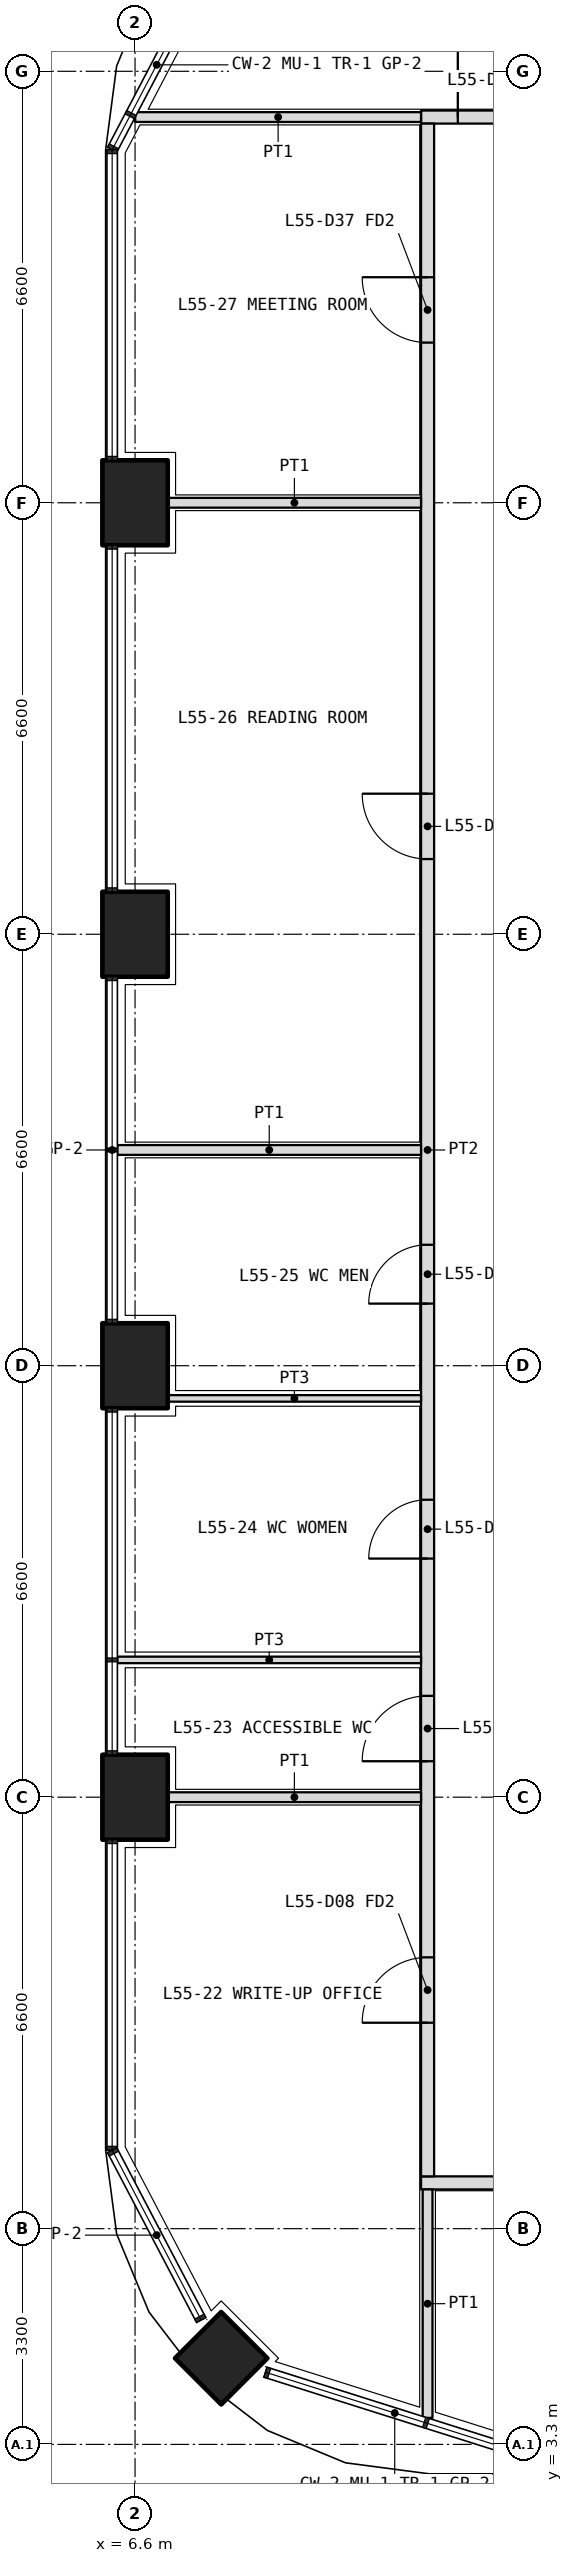
"""IFC4 building model, lengths in metres.
Left out: names, types, materials, properties, quantities, classifications, styles, units other than length and angle.
Written with IfcOpenShell. Run it as: python <this file> out.ifc"""

import sys

from ifc_helpers import new_model, si_unit, direction, frame, frame_2d, origin, origin_2d, place, context, subcontext, project, spatial, rectangle, extrude, element, fill, save


model = new_model("IFC4")
c1 = context("Model", 3, precision=1e-05, world=origin(), true_north=direction((0.0, 1.0)))
c2 = subcontext(c1, "Body", "Model", "MODEL_VIEW")
j1 = project(units=[si_unit("LENGTHUNIT", "METRE"), si_unit("PLANEANGLEUNIT", "RADIAN")], contexts=[c1])
p1 = place(None, origin())
s1 = spatial("IfcSite", under=j1, at=p1, CompositionType="ELEMENT")
p2 = place(p1, origin())
s2 = spatial("IfcBuilding", under=s1, at=p2, CompositionType="ELEMENT")
p3 = place(p2, frame((0.0, 0.0, 241.8)))
s3 = spatial("IfcBuildingStorey", under=s2, at=p3, CompositionType="ELEMENT", Elevation=241.8)
p4 = place(p3, frame((7.918, 4.618, 0.0), z_axis=(0.0, 0.0, 1.0), x_axis=(0.707106781187, 0.707106781187, 0.0)))
e1 = element("IfcColumn", 1, at=p4, inside=s3, PredefinedType="COLUMN", context=c2, shape_type="SweptSolid", body=[
    extrude(rectangle(XDim=1.0, YDim=1.0, at=origin_2d()), origin(), (0.0, 0.0, 1.0), 4.2),
])
for number, where, z_axis, x_axis in (
    (2, (6.6, 13.2, 0.0), (0.0, 0.0, 1.0), (0.0, 1.0, 0.0)),
    (3, (6.6, 19.8, 0.0), (0.0, 0.0, 1.0), (0.0, 1.0, 0.0)),
    (4, (6.6, 26.4, 0.0), (0.0, 0.0, 1.0), (0.0, 1.0, 0.0)),
    (5, (6.6, 33.0, 0.0), (0.0, 0.0, 1.0), (0.0, 1.0, 0.0)),
):
    element("IfcColumn", number, at=place(p3, frame(where, z_axis=z_axis, x_axis=x_axis)), inside=s3, PredefinedType="COLUMN", context=c2, shape_type="SweptSolid", body=[
        extrude(rectangle(XDim=1.3, YDim=1.0, at=origin_2d()), origin(), (0.0, 0.0, 1.0), 4.2),
    ])
p5 = place(p3, frame((10.975, 7.3, 0.0), z_axis=(0.0, 0.0, 1.0), x_axis=(1.0, 0.0, 0.0)))
e6 = element("IfcWall", 6, at=p5, inside=s3, PredefinedType="PARTITIONING", context=c2, shape_type="SweptSolid", body=[
    extrude(rectangle(XDim=30.85, YDim=0.2, at=frame_2d((15.425, 0.0))), origin(), (0.0, 0.0, 1.0), 3.0),
])
p6 = place(p5, frame((3.863, 0.0, 0.0)))
e7 = element("IfcOpeningElement", 7, at=p6, cuts=e6, PredefinedType="OPENING", context=c2, shape_type="SweptSolid", body=[
    extrude(rectangle(XDim=1.2, YDim=2.1, at=frame_2d((0.6, 1.05))), frame((0.0, 0.11, 0.0), z_axis=(0.0, -1.0, 0.0), x_axis=(1.0, 0.0, 0.0)), (0.0, 0.0, 1.0), 0.22),
])
p7 = place(p5, frame((16.575, 0.0, 0.0)))
e8 = element("IfcOpeningElement", 8, at=p7, cuts=e6, PredefinedType="OPENING", context=c2, shape_type="SweptSolid", body=[
    extrude(rectangle(XDim=1.0, YDim=2.1, at=frame_2d((0.5, 1.05))), frame((0.0, 0.11, 0.0), z_axis=(0.0, -1.0, 0.0), x_axis=(1.0, 0.0, 0.0)), (0.0, 0.0, 1.0), 0.22),
])
p8 = place(p5, frame((27.538, 0.0, 0.0)))
e9 = element("IfcOpeningElement", 9, at=p8, cuts=e6, PredefinedType="OPENING", context=c2, shape_type="SweptSolid", body=[
    extrude(rectangle(XDim=1.0, YDim=2.1, at=frame_2d((0.5, 1.05))), frame((0.0, 0.11, 0.0), z_axis=(0.0, -1.0, 0.0), x_axis=(1.0, 0.0, 0.0)), (0.0, 0.0, 1.0), 0.22),
])
p9 = place(p3, frame((10.975, 38.9, 0.0), z_axis=(0.0, 0.0, 1.0), x_axis=(1.0, 0.0, 0.0)))
e10 = element("IfcWall", 10, at=p9, inside=s3, PredefinedType="PARTITIONING", context=c2, shape_type="SweptSolid", body=[
    extrude(rectangle(XDim=22.025, YDim=0.2, at=frame_2d((11.012, 0.0))), origin(), (0.0, 0.0, 1.0), 3.0),
])
p10 = place(p9, frame((0.562, 0.0, 0.0)))
e11 = element("IfcOpeningElement", 11, at=p10, cuts=e10, PredefinedType="OPENING", context=c2, shape_type="SweptSolid", body=[
    extrude(rectangle(XDim=1.2, YDim=2.1, at=frame_2d((0.6, 1.05))), frame((0.0, 0.11, 0.0), z_axis=(0.0, -1.0, 0.0), x_axis=(1.0, 0.0, 0.0)), (0.0, 0.0, 1.0), 0.22),
])
p11 = place(p9, frame((6.675, 0.0, 0.0)))
e12 = element("IfcOpeningElement", 12, at=p11, cuts=e10, PredefinedType="OPENING", context=c2, shape_type="SweptSolid", body=[
    extrude(rectangle(XDim=1.0, YDim=2.1, at=frame_2d((0.5, 1.05))), frame((0.0, 0.11, 0.0), z_axis=(0.0, -1.0, 0.0), x_axis=(1.0, 0.0, 0.0)), (0.0, 0.0, 1.0), 0.22),
])
p12 = place(p9, frame((13.375, 0.0, 0.0)))
e13 = element("IfcOpeningElement", 13, at=p12, cuts=e10, PredefinedType="OPENING", context=c2, shape_type="SweptSolid", body=[
    extrude(rectangle(XDim=1.0, YDim=2.1, at=frame_2d((0.5, 1.05))), frame((0.0, 0.11, 0.0), z_axis=(0.0, -1.0, 0.0), x_axis=(1.0, 0.0, 0.0)), (0.0, 0.0, 1.0), 0.22),
])
p13 = place(p9, frame((16.675, 0.0, 0.0)))
e14 = element("IfcOpeningElement", 14, at=p13, cuts=e10, PredefinedType="OPENING", context=c2, shape_type="SweptSolid", body=[
    extrude(rectangle(XDim=1.0, YDim=2.1, at=frame_2d((0.5, 1.05))), frame((0.0, 0.11, 0.0), z_axis=(0.0, -1.0, 0.0), x_axis=(1.0, 0.0, 0.0)), (0.0, 0.0, 1.0), 0.22),
])
p14 = place(p9, frame((19.875, 0.0, 0.0)))
e15 = element("IfcOpeningElement", 15, at=p14, cuts=e10, PredefinedType="OPENING", context=c2, shape_type="SweptSolid", body=[
    extrude(rectangle(XDim=1.0, YDim=2.1, at=frame_2d((0.5, 1.05))), frame((0.0, 0.11, 0.0), z_axis=(0.0, -1.0, 0.0), x_axis=(1.0, 0.0, 0.0)), (0.0, 0.0, 1.0), 0.22),
])
p15 = place(p3, frame((11.075, 7.4, 0.0), z_axis=(0.0, 0.0, 1.0), x_axis=(0.0, 1.0, 0.0)))
e16 = element("IfcWall", 16, at=p15, inside=s3, PredefinedType="PARTITIONING", context=c2, shape_type="SweptSolid", body=[
    extrude(rectangle(XDim=31.4, YDim=0.2, at=frame_2d((15.7, 0.0))), origin(), (0.0, 0.0, 1.0), 3.0),
])
p16 = place(p15, frame((2.35, 0.0, 0.0)))
e17 = element("IfcOpeningElement", 17, at=p16, cuts=e16, PredefinedType="OPENING", context=c2, shape_type="SweptSolid", body=[
    extrude(rectangle(XDim=1.0, YDim=2.1, at=frame_2d((0.5, 1.05))), frame((0.0, 0.11, 0.0), z_axis=(0.0, -1.0, 0.0), x_axis=(1.0, 0.0, 0.0)), (0.0, 0.0, 1.0), 0.22),
])
p17 = place(p15, frame((6.35, 0.0, 0.0)))
e18 = element("IfcOpeningElement", 18, at=p17, cuts=e16, PredefinedType="OPENING", context=c2, shape_type="SweptSolid", body=[
    extrude(rectangle(XDim=1.0, YDim=2.1, at=frame_2d((0.5, 1.05))), frame((0.0, 0.11, 0.0), z_axis=(0.0, -1.0, 0.0), x_axis=(1.0, 0.0, 0.0)), (0.0, 0.0, 1.0), 0.22),
])
p18 = place(p15, frame((9.45, 0.0, 0.0)))
e19 = element("IfcOpeningElement", 19, at=p18, cuts=e16, PredefinedType="OPENING", context=c2, shape_type="SweptSolid", body=[
    extrude(rectangle(XDim=0.9, YDim=2.1, at=frame_2d((0.45, 1.05))), frame((0.0, 0.11, 0.0), z_axis=(0.0, -1.0, 0.0), x_axis=(1.0, 0.0, 0.0)), (0.0, 0.0, 1.0), 0.22),
])
p19 = place(p15, frame((13.35, 0.0, 0.0)))
e20 = element("IfcOpeningElement", 20, at=p19, cuts=e16, PredefinedType="OPENING", context=c2, shape_type="SweptSolid", body=[
    extrude(rectangle(XDim=0.9, YDim=2.1, at=frame_2d((0.45, 1.05))), frame((0.0, 0.11, 0.0), z_axis=(0.0, -1.0, 0.0), x_axis=(1.0, 0.0, 0.0)), (0.0, 0.0, 1.0), 0.22),
])
p20 = place(p15, frame((20.15, 0.0, 0.0)))
e21 = element("IfcOpeningElement", 21, at=p20, cuts=e16, PredefinedType="OPENING", context=c2, shape_type="SweptSolid", body=[
    extrude(rectangle(XDim=1.0, YDim=2.1, at=frame_2d((0.5, 1.05))), frame((0.0, 0.11, 0.0), z_axis=(0.0, -1.0, 0.0), x_axis=(1.0, 0.0, 0.0)), (0.0, 0.0, 1.0), 0.22),
])
p21 = place(p15, frame((28.05, 0.0, 0.0)))
e22 = element("IfcOpeningElement", 22, at=p21, cuts=e16, PredefinedType="OPENING", context=c2, shape_type="SweptSolid", body=[
    extrude(rectangle(XDim=1.0, YDim=2.1, at=frame_2d((0.5, 1.05))), frame((0.0, 0.11, 0.0), z_axis=(0.0, -1.0, 0.0), x_axis=(1.0, 0.0, 0.0)), (0.0, 0.0, 1.0), 0.22),
])
p22 = place(p3, frame((11.075, 3.705, 0.0), z_axis=(0.0, 0.0, 1.0), x_axis=(0.0, 1.0, 0.0)))
e23 = element("IfcWall", 23, at=p22, inside=s3, PredefinedType="PARTITIONING", context=c2, shape_type="SweptSolid", body=[
    extrude(rectangle(XDim=3.495, YDim=0.15, at=frame_2d((1.748, 0.0))), origin(), (0.0, 0.0, 1.0), 2.7),
])
p23 = place(p3, frame((6.603, 38.9, 0.0), z_axis=(0.0, 0.0, 1.0), x_axis=(1.0, 0.0, 0.0)))
e24 = element("IfcWall", 24, at=p23, inside=s3, PredefinedType="PARTITIONING", context=c2, shape_type="SweptSolid", body=[
    extrude(rectangle(XDim=4.373, YDim=0.15, at=frame_2d((2.186, 0.0))), origin(), (0.0, 0.0, 1.0), 2.7),
])
p24 = place(p3, frame((6.33, 15.3, 0.0), z_axis=(0.0, 0.0, 1.0), x_axis=(1.0, 0.0, 0.0)))
e25 = element("IfcWall", 25, at=p24, inside=s3, PredefinedType="PARTITIONING", context=c2, shape_type="SweptSolid", body=[
    extrude(rectangle(XDim=4.645, YDim=0.1, at=frame_2d((2.323, 0.0))), origin(), (0.0, 0.0, 1.0), 2.7),
])
p25 = place(p3, frame((7.1, 19.3, 0.0), z_axis=(0.0, 0.0, 1.0), x_axis=(1.0, 0.0, 0.0)))
e26 = element("IfcWall", 26, at=p25, inside=s3, PredefinedType="PARTITIONING", context=c2, shape_type="SweptSolid", body=[
    extrude(rectangle(XDim=3.875, YDim=0.1, at=frame_2d((1.938, 0.0))), origin(), (0.0, 0.0, 1.0), 3.0),
])
p26 = place(p3, frame((6.33, 23.1, 0.0), z_axis=(0.0, 0.0, 1.0), x_axis=(1.0, 0.0, 0.0)))
e27 = element("IfcWall", 27, at=p26, inside=s3, PredefinedType="PARTITIONING", context=c2, shape_type="SweptSolid", body=[
    extrude(rectangle(XDim=4.645, YDim=0.15, at=frame_2d((2.323, 0.0))), origin(), (0.0, 0.0, 1.0), 2.7),
])
for number, where, z_axis, x_axis in (
    (28, (7.1, 13.2, 0.0), (0.0, 0.0, 1.0), (1.0, 0.0, 0.0)),
    (29, (7.1, 33.0, 0.0), (0.0, 0.0, 1.0), (1.0, 0.0, 0.0)),
):
    element("IfcWall", number, at=place(p3, frame(where, z_axis=z_axis, x_axis=x_axis)), inside=s3, PredefinedType="PARTITIONING", context=c2, shape_type="SweptSolid", body=[
        extrude(rectangle(XDim=3.875, YDim=0.15, at=frame_2d((1.938, 0.0))), origin(), (0.0, 0.0, 1.0), 3.0),
    ])
p27 = place(p10, origin())
e30 = element("IfcDoor", 30, at=p27, inside=s3, OperationType="DOUBLE_DOOR_SINGLE_SWING", PredefinedType="DOOR", context=c2, shape_type="SweptSolid", body=[
    extrude(rectangle(XDim=1.2, YDim=2.1, at=frame_2d((0.6, 1.05))), frame((0.0, 0.025, 0.0), z_axis=(0.0, -1.0, 0.0), x_axis=(1.0, 0.0, 0.0)), (0.0, 0.0, 1.0), 0.05),
])
fill(e11, e30)
p28 = place(p16, origin())
e31 = element("IfcDoor", 31, at=p28, inside=s3, OperationType="SINGLE_SWING_LEFT", PredefinedType="DOOR", context=c2, shape_type="SweptSolid", body=[
    extrude(rectangle(XDim=1.0, YDim=2.1, at=frame_2d((0.5, 1.05))), frame((0.0, 0.025, 0.0), z_axis=(0.0, -1.0, 0.0), x_axis=(1.0, 0.0, 0.0)), (0.0, 0.0, 1.0), 0.05),
])
fill(e17, e31)
p29 = place(p17, origin())
e32 = element("IfcDoor", 32, at=p29, inside=s3, OperationType="SINGLE_SWING_LEFT", PredefinedType="DOOR", context=c2, shape_type="SweptSolid", body=[
    extrude(rectangle(XDim=1.0, YDim=2.1, at=frame_2d((0.5, 1.05))), frame((0.0, 0.025, 0.0), z_axis=(0.0, -1.0, 0.0), x_axis=(1.0, 0.0, 0.0)), (0.0, 0.0, 1.0), 0.05),
])
fill(e18, e32)
p30 = place(p18, origin())
e33 = element("IfcDoor", 33, at=p30, inside=s3, OperationType="SINGLE_SWING_LEFT", PredefinedType="DOOR", context=c2, shape_type="SweptSolid", body=[
    extrude(rectangle(XDim=0.9, YDim=2.1, at=frame_2d((0.45, 1.05))), frame((0.0, 0.025, 0.0), z_axis=(0.0, -1.0, 0.0), x_axis=(1.0, 0.0, 0.0)), (0.0, 0.0, 1.0), 0.05),
])
fill(e19, e33)
p31 = place(p19, origin())
e34 = element("IfcDoor", 34, at=p31, inside=s3, OperationType="SINGLE_SWING_LEFT", PredefinedType="DOOR", context=c2, shape_type="SweptSolid", body=[
    extrude(rectangle(XDim=0.9, YDim=2.1, at=frame_2d((0.45, 1.05))), frame((0.0, 0.025, 0.0), z_axis=(0.0, -1.0, 0.0), x_axis=(1.0, 0.0, 0.0)), (0.0, 0.0, 1.0), 0.05),
])
fill(e20, e34)
p32 = place(p20, origin())
e35 = element("IfcDoor", 35, at=p32, inside=s3, OperationType="SINGLE_SWING_RIGHT", PredefinedType="DOOR", context=c2, shape_type="SweptSolid", body=[
    extrude(rectangle(XDim=1.0, YDim=2.1, at=frame_2d((0.5, 1.05))), frame((0.0, 0.025, 0.0), z_axis=(0.0, -1.0, 0.0), x_axis=(1.0, 0.0, 0.0)), (0.0, 0.0, 1.0), 0.05),
])
fill(e21, e35)
p33 = place(p21, origin())
e36 = element("IfcDoor", 36, at=p33, inside=s3, OperationType="SINGLE_SWING_RIGHT", PredefinedType="DOOR", context=c2, shape_type="SweptSolid", body=[
    extrude(rectangle(XDim=1.0, YDim=2.1, at=frame_2d((0.5, 1.05))), frame((0.0, 0.025, 0.0), z_axis=(0.0, -1.0, 0.0), x_axis=(1.0, 0.0, 0.0)), (0.0, 0.0, 1.0), 0.05),
])
fill(e22, e36)
save(model, sys.argv[1])
